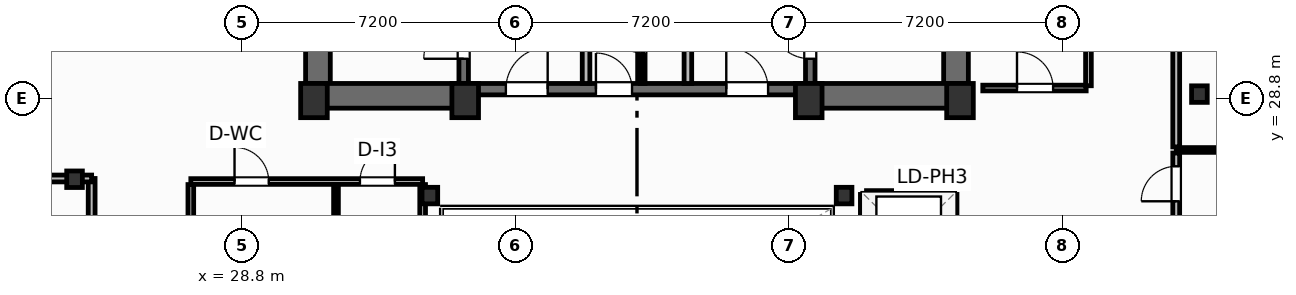
"""IFC4 building model, lengths in metres.
Left out: names, types, materials, properties, quantities, classifications, styles, units other than length and angle.
Written with IfcOpenShell. Run it as: python <this file> out.ifc"""

import sys

from ifc_helpers import new_model, si_unit, direction, frame, frame_2d, origin, origin_2d, place, context, subcontext, project, spatial, rectangle, i_section, extrude, element, fill, save


model = new_model("IFC4")
c1 = context("Model", 3, precision=1e-05, world=origin(), true_north=direction((0.0, 1.0)))
c2 = subcontext(c1, "Body", "Model", "MODEL_VIEW")
j1 = project(units=[si_unit("LENGTHUNIT", "METRE"), si_unit("PLANEANGLEUNIT", "RADIAN")], contexts=[c1])
p1 = place(None, origin())
s1 = spatial("IfcSite", under=j1, at=p1, CompositionType="ELEMENT")
p2 = place(p1, origin())
s2 = spatial("IfcBuilding", under=s1, at=p2, CompositionType="ELEMENT")
p3 = place(p2, frame((0.0, 0.0, 246.0)))
s3 = spatial("IfcBuildingStorey", under=s2, at=p3, CompositionType="ELEMENT", Elevation=246.0)
for number, where, z_axis, x_axis in (
    (1, (30.7, 28.75, 0.0), (0.0, 0.0, 1.0), (1.0, 0.0, 0.0)),
    (2, (34.68, 28.75, 0.0), (0.0, 0.0, 1.0), (1.0, 0.0, 0.0)),
    (3, (43.72, 28.75, 0.0), (0.0, 0.0, 1.0), (1.0, 0.0, 0.0)),
    (4, (47.7, 28.75, 0.0), (0.0, 0.0, 1.0), (1.0, 0.0, 0.0)),
):
    element("IfcColumn", number, at=place(p3, frame(where, z_axis=z_axis, x_axis=x_axis)), inside=s3, PredefinedType="COLUMN", context=c2, shape_type="SweptSolid", body=[
        extrude(rectangle(XDim=0.7, YDim=0.9, at=origin_2d()), origin(), (0.0, 0.0, 1.0), 3.7),
    ])
for number, where, z_axis, x_axis in (
    (5, (33.75, 26.25, 0.0), (0.0, 0.0, 1.0), (1.0, 0.0, 0.0)),
    (6, (44.65, 26.25, 0.0), (0.0, 0.0, 1.0), (1.0, 0.0, 0.0)),
    (7, (24.4, 26.68, 0.0), (0.0, 0.0, 1.0), (1.0, 0.0, 0.0)),
    (8, (54.0, 28.92, 0.0), (0.0, 0.0, 1.0), (1.0, 0.0, 0.0)),
):
    element("IfcColumn", number, at=place(p3, frame(where, z_axis=z_axis, x_axis=x_axis)), inside=s3, PredefinedType="COLUMN", context=c2, shape_type="SweptSolid", body=[
        extrude(i_section(OverallWidth=0.412, OverallDepth=0.435, WebThickness=0.036, FlangeThickness=0.057, FilletRadius=0.025, at=origin_2d()), origin(), (0.0, 0.0, 1.0), 3.7),
    ])
for number, where, z_axis, x_axis in (
    (9, (30.805, 29.2, 0.0), (0.0, 0.0, 1.0), (0.0, 1.0, 0.0)),
    (10, (47.595, 29.2, 0.0), (0.0, 0.0, 1.0), (0.0, 1.0, 0.0)),
):
    element("IfcWall", number, at=place(p3, frame(where, z_axis=z_axis, x_axis=x_axis)), inside=s3, PredefinedType="SHEAR", context=c2, shape_type="SweptSolid", body=[
        extrude(rectangle(XDim=9.22, YDim=0.65, at=frame_2d((4.61, 0.0))), origin(), (0.0, 0.0, 1.0), 3.45),
    ])
p4 = place(p3, frame((30.48, 28.875, 0.0), z_axis=(0.0, 0.0, 1.0), x_axis=(1.0, 0.0, 0.0)))
e11 = element("IfcWall", 11, at=p4, inside=s3, PredefinedType="SHEAR", context=c2, shape_type="SweptSolid", body=[
    extrude(rectangle(XDim=4.32, YDim=0.65, at=frame_2d((2.16, 0.0))), origin(), (0.0, 0.0, 1.0), 3.45),
])
p5 = place(p3, frame((43.6, 28.875, 0.0), z_axis=(0.0, 0.0, 1.0), x_axis=(1.0, 0.0, 0.0)))
e12 = element("IfcWall", 12, at=p5, inside=s3, PredefinedType="SHEAR", context=c2, shape_type="SweptSolid", body=[
    extrude(rectangle(XDim=4.32, YDim=0.65, at=frame_2d((2.16, 0.0))), origin(), (0.0, 0.0, 1.0), 3.45),
])
p6 = place(p3, frame((34.8, 29.05, 0.0), z_axis=(0.0, 0.0, 1.0), x_axis=(1.0, 0.0, 0.0)))
e13 = element("IfcWall", 13, at=p6, inside=s3, PredefinedType="SHEAR", context=c2, shape_type="SweptSolid", body=[
    extrude(rectangle(XDim=8.8, YDim=0.3, at=frame_2d((4.4, 0.0))), origin(), (0.0, 0.0, 1.0), 3.45),
])
p7 = place(p6, frame((0.95, 0.0, 0.0)))
e14 = element("IfcOpeningElement", 14, at=p7, cuts=e13, PredefinedType="OPENING", context=c2, shape_type="SweptSolid", body=[
    extrude(rectangle(XDim=1.1, YDim=2.15, at=frame_2d((0.55, 1.075))), frame((0.0, 0.16, 0.0), z_axis=(0.0, -1.0, 0.0), x_axis=(1.0, 0.0, 0.0)), (0.0, 0.0, 1.0), 0.32),
])
p8 = place(p6, frame((6.75, 0.0, 0.0)))
e15 = element("IfcOpeningElement", 15, at=p8, cuts=e13, PredefinedType="OPENING", context=c2, shape_type="SweptSolid", body=[
    extrude(rectangle(XDim=1.1, YDim=2.15, at=frame_2d((0.55, 1.075))), frame((0.0, 0.16, 0.0), z_axis=(0.0, -1.0, 0.0), x_axis=(1.0, 0.0, 0.0)), (0.0, 0.0, 1.0), 0.32),
])
p9 = place(p6, frame((3.32, 0.0, 0.0)))
e16 = element("IfcOpeningElement", 16, at=p9, cuts=e13, PredefinedType="OPENING", context=c2, shape_type="SweptSolid", body=[
    extrude(rectangle(XDim=0.95, YDim=2.15, at=frame_2d((0.475, 1.075))), frame((0.0, 0.16, 0.0), z_axis=(0.0, -1.0, 0.0), x_axis=(1.0, 0.0, 0.0)), (0.0, 0.0, 1.0), 0.32),
])
p10 = place(p3, frame((34.64, 29.2, 0.0), z_axis=(0.0, 0.0, 1.0), x_axis=(0.0, 1.0, 0.0)))
e17 = element("IfcWall", 17, at=p10, inside=s3, PredefinedType="SHEAR", context=c2, shape_type="SweptSolid", body=[
    extrude(rectangle(XDim=9.22, YDim=0.25, at=frame_2d((4.61, 0.0))), origin(), (0.0, 0.0, 1.0), 3.45),
])
p11 = place(p10, frame((0.65, 0.0, 0.0)))
e18 = element("IfcOpeningElement", 18, at=p11, cuts=e17, PredefinedType="OPENING", context=c2, shape_type="SweptSolid", body=[
    extrude(rectangle(XDim=1.05, YDim=2.15, at=frame_2d((0.525, 1.075))), frame((0.0, 0.135, 0.0), z_axis=(0.0, -1.0, 0.0), x_axis=(1.0, 0.0, 0.0)), (0.0, 0.0, 1.0), 0.27),
])
p12 = place(p3, frame((43.76, 29.2, 0.0), z_axis=(0.0, 0.0, 1.0), x_axis=(0.0, 1.0, 0.0)))
e19 = element("IfcWall", 19, at=p12, inside=s3, PredefinedType="SHEAR", context=c2, shape_type="SweptSolid", body=[
    extrude(rectangle(XDim=9.22, YDim=0.25, at=frame_2d((4.61, 0.0))), origin(), (0.0, 0.0, 1.0), 3.45),
])
p13 = place(p12, frame((0.65, 0.0, 0.0)))
e20 = element("IfcOpeningElement", 20, at=p13, cuts=e19, PredefinedType="OPENING", context=c2, shape_type="SweptSolid", body=[
    extrude(rectangle(XDim=1.05, YDim=2.15, at=frame_2d((0.525, 1.075))), frame((0.0, 0.135, 0.0), z_axis=(0.0, -1.0, 0.0), x_axis=(1.0, 0.0, 0.0)), (0.0, 0.0, 1.0), 0.27),
])
p14 = place(p3, frame((24.85, 19.24, 0.0), z_axis=(0.0, 0.0, 1.0), x_axis=(0.0, 1.0, 0.0)))
e21 = element("IfcWall", 21, at=p14, inside=s3, PredefinedType="PARTITIONING", context=c2, shape_type="SweptSolid", body=[
    extrude(rectangle(XDim=7.46, YDim=0.18, at=frame_2d((3.73, 0.0))), origin(), (0.0, 0.0, 1.0), 3.45),
])
p15 = place(p14, frame((3.235, 0.0, 0.0)))
e22 = element("IfcOpeningElement", 22, at=p15, cuts=e21, PredefinedType="OPENING", context=c2, shape_type="SweptSolid", body=[
    extrude(rectangle(XDim=0.95, YDim=2.05, at=frame_2d((0.475, 1.025))), frame((0.0, 0.1, 0.0), z_axis=(0.0, -1.0, 0.0), x_axis=(1.0, 0.0, 0.0)), (0.0, 0.0, 1.0), 0.2),
])
p16 = place(p3, frame((3.467, 26.7, 0.0), z_axis=(0.0, 0.0, 1.0), x_axis=(1.0, 0.0, 0.0)))
e23 = element("IfcWall", 23, at=p16, inside=s3, PredefinedType="PARTITIONING", context=c2, shape_type="SweptSolid", body=[
    extrude(rectangle(XDim=21.383, YDim=0.18, at=frame_2d((10.691, 0.0))), origin(), (0.0, 0.0, 1.0), 2.662),
])
p17 = place(p3, frame((53.39, 19.3, 0.0), z_axis=(0.0, 0.0, 1.0), x_axis=(0.0, 1.0, 0.0)))
e24 = element("IfcWall", 24, at=p17, inside=s3, PredefinedType="PARTITIONING", context=c2, shape_type="SweptSolid", body=[
    extrude(rectangle(XDim=8.07, YDim=0.18, at=frame_2d((4.035, 0.0))), origin(), (0.0, 0.0, 1.0), 3.45),
])
p18 = place(p17, frame((6.8, 0.0, 0.0)))
e25 = element("IfcOpeningElement", 25, at=p18, cuts=e24, PredefinedType="OPENING", context=c2, shape_type="SweptSolid", body=[
    extrude(rectangle(XDim=0.92, YDim=2.05, at=frame_2d((0.46, 1.025))), frame((0.0, 0.1, 0.0), z_axis=(0.0, -1.0, 0.0), x_axis=(1.0, 0.0, 0.0)), (0.0, 0.0, 1.0), 0.2),
])
p19 = place(p3, frame((53.39, 27.53, 0.0), z_axis=(0.0, 0.0, 1.0), x_axis=(0.0, 1.0, 0.0)))
e26 = element("IfcWall", 26, at=p19, inside=s3, PredefinedType="PARTITIONING", context=c2, shape_type="SweptSolid", body=[
    extrude(rectangle(XDim=11.67, YDim=0.18, at=frame_2d((5.835, 0.0))), origin(), (0.0, 0.0, 1.0), 3.45),
])
p20 = place(p19, frame((5.8, 0.0, 0.0)))
e27 = element("IfcOpeningElement", 27, at=p20, cuts=e26, PredefinedType="OPENING", context=c2, shape_type="SweptSolid", body=[
    extrude(rectangle(XDim=0.92, YDim=2.05, at=frame_2d((0.46, 1.025))), frame((0.0, 0.1, 0.0), z_axis=(0.0, -1.0, 0.0), x_axis=(1.0, 0.0, 0.0)), (0.0, 0.0, 1.0), 0.2),
])
p21 = place(p3, frame((53.39, 27.45, 0.0), z_axis=(0.0, 0.0, 1.0), x_axis=(1.0, 0.0, 0.0)))
e28 = element("IfcWall", 28, at=p21, inside=s3, PredefinedType="PARTITIONING", context=c2, shape_type="SweptSolid", body=[
    extrude(rectangle(XDim=20.199, YDim=0.125, at=frame_2d((10.1, 0.0))), origin(), (0.0, 0.0, 1.0), 2.739),
])
for number, where, z_axis, x_axis in (
    (29, (37.86, 29.2, 0.0), (0.0, 0.0, 1.0), (0.0, 1.0, 0.0)),
    (30, (40.54, 29.2, 0.0), (0.0, 0.0, 1.0), (0.0, 1.0, 0.0)),
):
    element("IfcWall", number, at=place(p3, frame(where, z_axis=z_axis, x_axis=x_axis)), inside=s3, PredefinedType="PARTITIONING", context=c2, shape_type="SweptSolid", body=[
        extrude(rectangle(XDim=5.18, YDim=0.2, at=frame_2d((2.59, 0.0))), origin(), (0.0, 0.0, 1.0), 3.45),
    ])
p22 = place(p3, frame((39.35, 29.2, 0.0), z_axis=(0.0, 0.0, 1.0), x_axis=(0.0, 1.0, 0.0)))
e31 = element("IfcWall", 31, at=p22, inside=s3, PredefinedType="PARTITIONING", context=c2, shape_type="SweptSolid", body=[
    extrude(rectangle(XDim=5.22, YDim=0.125, at=frame_2d((2.61, 0.0))), origin(), (0.0, 0.0, 1.0), 3.45),
])
p23 = place(p22, frame((0.8, 0.0, 0.0)))
e32 = element("IfcOpeningElement", 32, at=p23, cuts=e31, PredefinedType="OPENING", context=c2, shape_type="SweptSolid", body=[
    extrude(rectangle(XDim=0.85, YDim=2.05, at=frame_2d((0.425, 1.025))), frame((0.0, 0.073, 0.0), z_axis=(0.0, -1.0, 0.0), x_axis=(1.0, 0.0, 0.0)), (0.0, 0.0, 1.0), 0.145),
])
p24 = place(p22, frame((3.4, 0.0, 0.0)))
e33 = element("IfcOpeningElement", 33, at=p24, cuts=e31, PredefinedType="OPENING", context=c2, shape_type="SweptSolid", body=[
    extrude(rectangle(XDim=0.85, YDim=2.05, at=frame_2d((0.425, 1.025))), frame((0.0, 0.073, 0.0), z_axis=(0.0, -1.0, 0.0), x_axis=(1.0, 0.0, 0.0)), (0.0, 0.0, 1.0), 0.145),
])
p25 = place(p3, frame((27.46, 26.62, 0.0), z_axis=(0.0, 0.0, 1.0), x_axis=(1.0, 0.0, 0.0)))
e34 = element("IfcWall", 34, at=p25, inside=s3, PredefinedType="PARTITIONING", context=c2, shape_type="SweptSolid", body=[
    extrude(rectangle(XDim=6.1, YDim=0.15, at=frame_2d((3.05, 0.0))), origin(), (0.0, 0.0, 1.0), 2.662),
])
p26 = place(p25, frame((1.15, 0.0, 0.0)))
e35 = element("IfcOpeningElement", 35, at=p26, cuts=e34, PredefinedType="OPENING", context=c2, shape_type="SweptSolid", body=[
    extrude(rectangle(XDim=0.9, YDim=2.05, at=frame_2d((0.45, 1.025))), frame((0.0, 0.085, 0.0), z_axis=(0.0, -1.0, 0.0), x_axis=(1.0, 0.0, 0.0)), (0.0, 0.0, 1.0), 0.17),
])
p27 = place(p25, frame((4.45, 0.0, 0.0)))
e36 = element("IfcOpeningElement", 36, at=p27, cuts=e34, PredefinedType="OPENING", context=c2, shape_type="SweptSolid", body=[
    extrude(rectangle(XDim=0.92, YDim=2.05, at=frame_2d((0.46, 1.025))), frame((0.0, 0.085, 0.0), z_axis=(0.0, -1.0, 0.0), x_axis=(1.0, 0.0, 0.0)), (0.0, 0.0, 1.0), 0.17),
])
p28 = place(p3, frame((31.28, 19.38, 0.0), z_axis=(0.0, 0.0, 1.0), x_axis=(0.0, 1.0, 0.0)))
e37 = element("IfcWall", 37, at=p28, inside=s3, PredefinedType="PARTITIONING", context=c2, shape_type="SweptSolid", body=[
    extrude(rectangle(XDim=7.16, YDim=0.125, at=frame_2d((3.58, 0.0))), origin(), (0.0, 0.0, 1.0), 3.45),
])
p29 = place(p3, frame((27.46, 19.38, 0.0), z_axis=(0.0, 0.0, 1.0), x_axis=(0.0, 1.0, 0.0)))
e38 = element("IfcWall", 38, at=p29, inside=s3, PredefinedType="PARTITIONING", context=c2, shape_type="SweptSolid", body=[
    extrude(rectangle(XDim=7.16, YDim=0.15, at=frame_2d((3.58, 0.0))), origin(), (0.0, 0.0, 1.0), 3.45),
])
p30 = place(p29, frame((1.4, 0.0, 0.0)))
e39 = element("IfcOpeningElement", 39, at=p30, cuts=e38, PredefinedType="OPENING", context=c2, shape_type="SweptSolid", body=[
    extrude(rectangle(XDim=0.95, YDim=2.05, at=frame_2d((0.475, 1.025))), frame((0.0, 0.085, 0.0), z_axis=(0.0, -1.0, 0.0), x_axis=(1.0, 0.0, 0.0)), (0.0, 0.0, 1.0), 0.17),
])
p31 = place(p3, frame((33.56, 19.38, 0.0), z_axis=(0.0, 0.0, 1.0), x_axis=(0.0, 1.0, 0.0)))
e40 = element("IfcWall", 40, at=p31, inside=s3, PredefinedType="PARTITIONING", context=c2, shape_type="SweptSolid", body=[
    extrude(rectangle(XDim=7.16, YDim=0.15, at=frame_2d((3.58, 0.0))), origin(), (0.0, 0.0, 1.0), 2.824),
])
p32 = place(p3, frame((48.3, 29.08, 0.0), z_axis=(0.0, 0.0, 1.0), x_axis=(1.0, 0.0, 0.0)))
e41 = element("IfcWall", 41, at=p32, inside=s3, PredefinedType="PARTITIONING", context=c2, shape_type="SweptSolid", body=[
    extrude(rectangle(XDim=2.72, YDim=0.15, at=frame_2d((1.36, 0.0))), origin(), (0.0, 0.0, 1.0), 2.662),
])
p33 = place(p32, frame((0.9, 0.0, 0.0)))
e42 = element("IfcOpeningElement", 42, at=p33, cuts=e41, PredefinedType="OPENING", context=c2, shape_type="SweptSolid", body=[
    extrude(rectangle(XDim=0.95, YDim=2.05, at=frame_2d((0.475, 1.025))), frame((0.0, 0.085, 0.0), z_axis=(0.0, -1.0, 0.0), x_axis=(1.0, 0.0, 0.0)), (0.0, 0.0, 1.0), 0.17),
])
p34 = place(p3, frame((51.08, 29.14, 0.0), z_axis=(0.0, 0.0, 1.0), x_axis=(0.0, 1.0, 0.0)))
e43 = element("IfcWall", 43, at=p34, inside=s3, PredefinedType="PARTITIONING", context=c2, shape_type="SweptSolid", body=[
    extrude(rectangle(XDim=4.69, YDim=0.15, at=frame_2d((2.345, 0.0))), origin(), (0.0, 0.0, 1.0), 3.45),
])
p35 = place(p3, frame((45.24, 26.28, 0.0), z_axis=(0.0, 0.0, 1.0), x_axis=(1.0, 0.0, 0.0)))
e44 = element("IfcWall", 44, at=p35, inside=s3, PredefinedType="PARTITIONING", context=c2, shape_type="SweptSolid", body=[
    extrude(rectangle(XDim=2.22, YDim=0.2, at=frame_2d((1.11, 0.0))), origin(), (0.0, 0.0, 1.0), 3.45),
])
p36 = place(p3, frame((45.18, 19.38, 0.0), z_axis=(0.0, 0.0, 1.0), x_axis=(0.0, 1.0, 0.0)))
e45 = element("IfcWall", 45, at=p36, inside=s3, PredefinedType="PARTITIONING", context=c2, shape_type="SweptSolid", body=[
    extrude(rectangle(XDim=6.9, YDim=0.2, at=frame_2d((3.45, 0.0))), origin(), (0.0, 0.0, 1.0), 3.45),
])
p37 = place(p3, frame((47.52, 19.38, 0.0), z_axis=(0.0, 0.0, 1.0), x_axis=(0.0, 1.0, 0.0)))
e46 = element("IfcWall", 46, at=p37, inside=s3, PredefinedType="PARTITIONING", context=c2, shape_type="SweptSolid", body=[
    extrude(rectangle(XDim=6.9, YDim=0.2, at=frame_2d((3.45, 0.0))), origin(), (0.0, 0.0, 1.0), 3.45),
])
p38 = place(p37, frame((0.59, 0.0, 0.0)))
e47 = element("IfcOpeningElement", 47, at=p38, cuts=e46, PredefinedType="OPENING", context=c2, shape_type="SweptSolid", body=[
    extrude(rectangle(XDim=1.1, YDim=2.15, at=frame_2d((0.55, 1.075))), frame((0.0, 0.11, 0.0), z_axis=(0.0, -1.0, 0.0), x_axis=(1.0, 0.0, 0.0)), (0.0, 0.0, 1.0), 0.22),
])
p39 = place(p37, frame((2.89, 0.0, 0.0)))
e48 = element("IfcOpeningElement", 48, at=p39, cuts=e46, PredefinedType="OPENING", context=c2, shape_type="SweptSolid", body=[
    extrude(rectangle(XDim=1.1, YDim=2.15, at=frame_2d((0.55, 1.075))), frame((0.0, 0.11, 0.0), z_axis=(0.0, -1.0, 0.0), x_axis=(1.0, 0.0, 0.0)), (0.0, 0.0, 1.0), 0.22),
])
p40 = place(p37, frame((5.19, 0.0, 0.0)))
e49 = element("IfcOpeningElement", 49, at=p40, cuts=e46, PredefinedType="OPENING", context=c2, shape_type="SweptSolid", body=[
    extrude(rectangle(XDim=1.1, YDim=2.15, at=frame_2d((0.55, 1.075))), frame((0.0, 0.11, 0.0), z_axis=(0.0, -1.0, 0.0), x_axis=(1.0, 0.0, 0.0)), (0.0, 0.0, 1.0), 0.22),
])
p41 = place(p18, origin())
e50 = element("IfcDoor", 50, at=p41, inside=s3, OperationType="SINGLE_SWING_LEFT", PredefinedType="DOOR", context=c2, shape_type="SweptSolid", body=[
    extrude(rectangle(XDim=0.92, YDim=2.05, at=frame_2d((0.46, 1.025))), frame((0.0, 0.025, 0.0), z_axis=(0.0, -1.0, 0.0), x_axis=(1.0, 0.0, 0.0)), (0.0, 0.0, 1.0), 0.05),
])
fill(e25, e50)
p42 = place(p11, origin())
e51 = element("IfcDoor", 51, at=p42, inside=s3, OperationType="SINGLE_SWING_LEFT", PredefinedType="DOOR", context=c2, shape_type="SweptSolid", body=[
    extrude(rectangle(XDim=1.05, YDim=2.15, at=frame_2d((0.525, 1.075))), frame((0.0, 0.025, 0.0), z_axis=(0.0, -1.0, 0.0), x_axis=(1.0, 0.0, 0.0)), (0.0, 0.0, 1.0), 0.05),
])
fill(e18, e51)
p43 = place(p13, origin())
e52 = element("IfcDoor", 52, at=p43, inside=s3, OperationType="SINGLE_SWING_RIGHT", PredefinedType="DOOR", context=c2, shape_type="SweptSolid", body=[
    extrude(rectangle(XDim=1.05, YDim=2.15, at=frame_2d((0.525, 1.075))), frame((0.0, 0.025, 0.0), z_axis=(0.0, -1.0, 0.0), x_axis=(1.0, 0.0, 0.0)), (0.0, 0.0, 1.0), 0.05),
])
fill(e20, e52)
p44 = place(p7, origin())
e53 = element("IfcDoor", 53, at=p44, inside=s3, OperationType="SINGLE_SWING_RIGHT", PredefinedType="DOOR", context=c2, shape_type="SweptSolid", body=[
    extrude(rectangle(XDim=1.1, YDim=2.15, at=frame_2d((0.55, 1.075))), frame((0.0, 0.025, 0.0), z_axis=(0.0, -1.0, 0.0), x_axis=(1.0, 0.0, 0.0)), (0.0, 0.0, 1.0), 0.05),
])
fill(e14, e53)
p45 = place(p8, origin())
e54 = element("IfcDoor", 54, at=p45, inside=s3, OperationType="SINGLE_SWING_LEFT", PredefinedType="DOOR", context=c2, shape_type="SweptSolid", body=[
    extrude(rectangle(XDim=1.1, YDim=2.15, at=frame_2d((0.55, 1.075))), frame((0.0, 0.025, 0.0), z_axis=(0.0, -1.0, 0.0), x_axis=(1.0, 0.0, 0.0)), (0.0, 0.0, 1.0), 0.05),
])
fill(e15, e54)
p46 = place(p23, origin())
e55 = element("IfcDoor", 55, at=p46, inside=s3, OperationType="SINGLE_SWING_RIGHT", PredefinedType="DOOR", context=c2, shape_type="SweptSolid", body=[
    extrude(rectangle(XDim=0.85, YDim=2.05, at=frame_2d((0.425, 1.025))), frame((0.0, 0.025, 0.0), z_axis=(0.0, -1.0, 0.0), x_axis=(1.0, 0.0, 0.0)), (0.0, 0.0, 1.0), 0.05),
])
fill(e32, e55)
p47 = place(p9, origin())
e56 = element("IfcDoor", 56, at=p47, inside=s3, OperationType="SINGLE_SWING_LEFT", PredefinedType="DOOR", context=c2, shape_type="SweptSolid", body=[
    extrude(rectangle(XDim=0.95, YDim=2.15, at=frame_2d((0.475, 1.075))), frame((0.0, 0.025, 0.0), z_axis=(0.0, -1.0, 0.0), x_axis=(1.0, 0.0, 0.0)), (0.0, 0.0, 1.0), 0.05),
])
fill(e16, e56)
p48 = place(p26, origin())
e57 = element("IfcDoor", 57, at=p48, inside=s3, OperationType="SINGLE_SWING_LEFT", PredefinedType="DOOR", context=c2, shape_type="SweptSolid", body=[
    extrude(rectangle(XDim=0.9, YDim=2.05, at=frame_2d((0.45, 1.025))), frame((0.0, 0.025, 0.0), z_axis=(0.0, -1.0, 0.0), x_axis=(1.0, 0.0, 0.0)), (0.0, 0.0, 1.0), 0.05),
])
fill(e35, e57)
p49 = place(p27, origin())
e58 = element("IfcDoor", 58, at=p49, inside=s3, OperationType="SINGLE_SWING_RIGHT", PredefinedType="DOOR", context=c2, shape_type="SweptSolid", body=[
    extrude(rectangle(XDim=0.92, YDim=2.05, at=frame_2d((0.46, 1.025))), frame((0.0, 0.025, 0.0), z_axis=(0.0, -1.0, 0.0), x_axis=(1.0, 0.0, 0.0)), (0.0, 0.0, 1.0), 0.05),
])
fill(e36, e58)
p50 = place(p33, origin())
e59 = element("IfcDoor", 59, at=p50, inside=s3, OperationType="SINGLE_SWING_LEFT", PredefinedType="DOOR", context=c2, shape_type="SweptSolid", body=[
    extrude(rectangle(XDim=0.95, YDim=2.05, at=frame_2d((0.475, 1.025))), frame((0.0, 0.025, 0.0), z_axis=(0.0, -1.0, 0.0), x_axis=(1.0, 0.0, 0.0)), (0.0, 0.0, 1.0), 0.05),
])
fill(e42, e59)
save(model, sys.argv[1])
